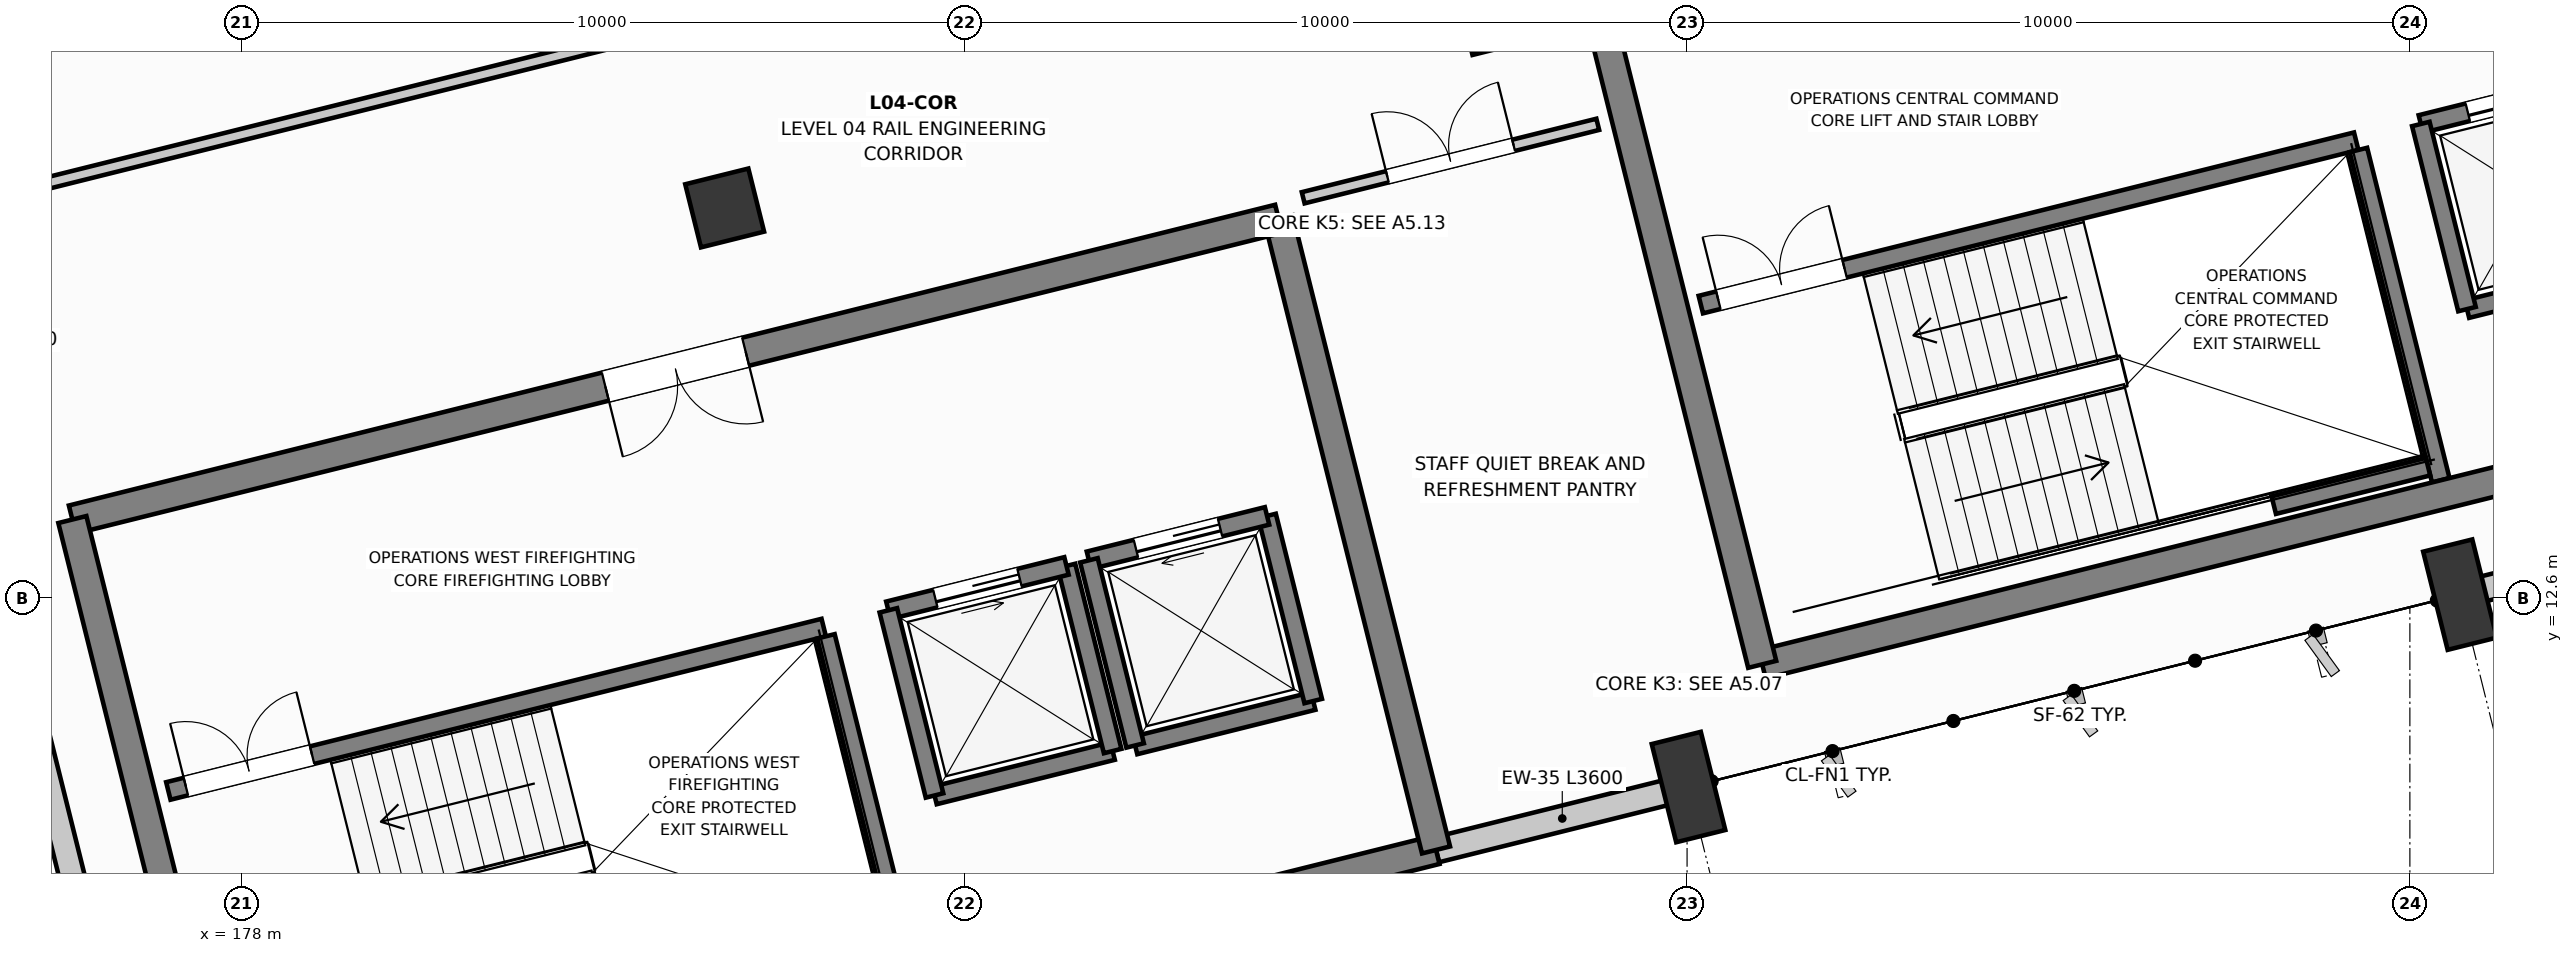
"""IFC4 building model, lengths in metres.
Left out: names, types, materials, properties, quantities, classifications, styles, units other than length and angle.
Written with IfcOpenShell. Run it as: python <this file> out.ifc"""

import sys

from ifc_helpers import new_model, si_unit, direction, frame, frame_2d, origin, origin_2d, place, context, subcontext, project, spatial, rectangle, extrude, element, fill, save


model = new_model("IFC4")
c1 = context("Model", 3, precision=1e-05, world=origin(), true_north=direction((0.0, 1.0)))
c2 = subcontext(c1, "Body", "Model", "MODEL_VIEW")
j1 = project(units=[si_unit("LENGTHUNIT", "METRE"), si_unit("PLANEANGLEUNIT", "RADIAN")], contexts=[c1])
p1 = place(None, origin())
s1 = spatial("IfcSite", under=j1, at=p1, CompositionType="ELEMENT")
p2 = place(p1, origin())
s2 = spatial("IfcBuilding", under=s1, at=p2, CompositionType="ELEMENT")
p3 = place(p2, frame((0.0, 0.0, 20.4)))
s3 = spatial("IfcBuildingStorey", under=s2, at=p3, CompositionType="ELEMENT", Elevation=20.4)
p4 = place(p3, frame((184.685, 17.995, 0.0), z_axis=(0.0, 0.0, 1.0), x_axis=(0.970295726276, 0.2419218956, 0.0)))
e1 = element("IfcColumn", 1, at=p4, inside=s3, PredefinedType="COLUMN", context=c2, shape_type="SweptSolid", body=[
    extrude(rectangle(XDim=0.9, YDim=0.9, at=origin_2d()), origin(), (0.0, 0.0, 1.0), 4.2),
])
p5 = place(p3, frame((198.02, 9.983, 0.0), z_axis=(0.0, 0.0, 1.0), x_axis=(0.970295726276, 0.2419218956, 0.0)))
e2 = element("IfcColumn", 2, at=p5, inside=s3, PredefinedType="COLUMN", context=c2, shape_type="SweptSolid", body=[
    extrude(rectangle(XDim=0.7, YDim=1.4, at=origin_2d()), origin(), (0.0, 0.0, 1.0), 4.2),
])
p6 = place(p3, frame((195.359, 20.657, 0.0), z_axis=(0.0, 0.0, 1.0), x_axis=(0.970295726276, 0.2419218956, 0.0)))
e3 = element("IfcColumn", 3, at=p6, inside=s3, PredefinedType="COLUMN", context=c2, shape_type="SweptSolid", body=[
    extrude(rectangle(XDim=0.9, YDim=0.9, at=origin_2d()), origin(), (0.0, 0.0, 1.0), 4.2),
])
p7 = place(p3, frame((208.693, 12.645, 0.0), z_axis=(0.0, 0.0, 1.0), x_axis=(0.970295726276, 0.2419218956, 0.0)))
e4 = element("IfcColumn", 4, at=p7, inside=s3, PredefinedType="COLUMN", context=c2, shape_type="SweptSolid", body=[
    extrude(rectangle(XDim=0.7, YDim=1.4, at=origin_2d()), origin(), (0.0, 0.0, 1.0), 4.2),
])
p8 = place(p3, frame((208.999, 12.721, 0.0), z_axis=(0.0, 0.0, 1.0), x_axis=(0.970297165187, 0.241916124371, 0.0)))
e5 = element("IfcWall", 5, at=p8, inside=s3, PredefinedType="STANDARD", context=c2, shape_type="SweptSolid", body=[
    extrude(rectangle(XDim=10.37, YDim=0.35, at=frame_2d((5.185, 0.0))), origin(), (0.0, 0.0, 1.0), 3.255),
])
p9 = place(p8, frame((1.692, 0.0, 0.85)))
e6 = element("IfcOpeningElement", 6, at=p9, cuts=e5, PredefinedType="OPENING", context=c2, shape_type="SweptSolid", body=[
    extrude(rectangle(XDim=1.8, YDim=1.65, at=frame_2d((0.9, 0.825))), frame((0.0, 0.185, 0.0), z_axis=(0.0, -1.0, 0.0), x_axis=(1.0, 0.0, 0.0)), (0.0, 0.0, 1.0), 0.37),
])
p10 = place(p8, frame((6.877, 0.0, 0.85)))
e7 = element("IfcOpeningElement", 7, at=p10, cuts=e5, PredefinedType="OPENING", context=c2, shape_type="SweptSolid", body=[
    extrude(rectangle(XDim=1.8, YDim=1.65, at=frame_2d((0.9, 0.825))), frame((0.0, 0.185, 0.0), z_axis=(0.0, -1.0, 0.0), x_axis=(1.0, 0.0, 0.0)), (0.0, 0.0, 1.0), 0.37),
])
p11 = place(p3, frame((174.113, 14.931, 0.0), z_axis=(0.0, 0.0, 1.0), x_axis=(0.241921235018, -0.970295890977, 0.0)))
e8 = element("IfcWall", 8, at=p11, inside=s3, PredefinedType="STANDARD", context=c2, shape_type="SweptSolid", body=[
    extrude(rectangle(XDim=9.92, YDim=0.35, at=frame_2d((4.96, 0.0))), origin(), (0.0, 0.0, 1.0), 2.795),
])
p12 = place(p11, frame((1.58, 0.0, 0.85)))
e9 = element("IfcOpeningElement", 9, at=p12, cuts=e8, PredefinedType="OPENING", context=c2, shape_type="SweptSolid", body=[
    extrude(rectangle(XDim=1.8, YDim=1.65, at=frame_2d((0.9, 0.825))), frame((0.0, 0.185, 0.0), z_axis=(0.0, -1.0, 0.0), x_axis=(1.0, 0.0, 0.0)), (0.0, 0.0, 1.0), 0.37),
])
p13 = place(p11, frame((6.54, 0.0, 0.85)))
e10 = element("IfcOpeningElement", 10, at=p13, cuts=e8, PredefinedType="OPENING", context=c2, shape_type="SweptSolid", body=[
    extrude(rectangle(XDim=1.8, YDim=1.65, at=frame_2d((0.9, 0.825))), frame((0.0, 0.185, 0.0), z_axis=(0.0, -1.0, 0.0), x_axis=(1.0, 0.0, 0.0)), (0.0, 0.0, 1.0), 0.37),
])
p14 = place(p3, frame((194.527, 9.113, 0.0), z_axis=(0.0, 0.0, 1.0), x_axis=(0.970297528922, 0.241914665466, 0.0)))
e11 = element("IfcWall", 11, at=p14, inside=s3, PredefinedType="STANDARD", context=c2, shape_type="SweptSolid", body=[
    extrude(rectangle(XDim=3.6, YDim=0.35, at=frame_2d((1.8, 0.0))), origin(), (0.0, 0.0, 1.0), 3.855),
])
p15 = place(p3, frame((187.588, 9.866, 0.0), z_axis=(0.0, 0.0, 1.0), x_axis=(0.97029284861, 0.241933436994, 0.0)))
e12 = element("IfcWall", 12, at=p15, inside=s3, PredefinedType="SOLIDWALL", context=c2, shape_type="SweptSolid", body=[
    extrude(rectangle(XDim=2.54, YDim=0.25, at=frame_2d((1.27, 0.0))), origin(), (0.0, 0.0, 1.0), 3.88),
])
p16 = place(p3, frame((190.053, 10.481, 0.0), z_axis=(0.0, 0.0, 1.0), x_axis=(-0.241938414856, 0.970291607413, 0.0)))
e13 = element("IfcWall", 13, at=p16, inside=s3, PredefinedType="SOLIDWALL", context=c2, shape_type="SweptSolid", body=[
    extrude(rectangle(XDim=2.64, YDim=0.25, at=frame_2d((1.32, 0.0))), origin(), (0.0, 0.0, 1.0), 3.88),
])
p17 = place(p3, frame((189.414, 13.042, 0.0), z_axis=(0.0, 0.0, 1.0), x_axis=(-0.97029284861, -0.241933436994, 0.0)))
e14 = element("IfcWall", 14, at=p17, inside=s3, PredefinedType="SOLIDWALL", context=c2, shape_type="SweptSolid", body=[
    extrude(rectangle(XDim=2.54, YDim=0.25, at=frame_2d((1.27, 0.0))), origin(), (0.0, 0.0, 1.0), 3.88),
])
p18 = place(p17, frame((0.67, 0.0, 0.0)))
e15 = element("IfcOpeningElement", 15, at=p18, cuts=e14, PredefinedType="OPENING", context=c2, shape_type="SweptSolid", body=[
    extrude(rectangle(XDim=1.2, YDim=2.2, at=frame_2d((0.6, 1.1))), frame((0.0, 0.135, 0.0), z_axis=(0.0, -1.0, 0.0), x_axis=(1.0, 0.0, 0.0)), (0.0, 0.0, 1.0), 0.27),
])
p19 = place(p3, frame((186.95, 12.428, 0.0), z_axis=(0.0, 0.0, 1.0), x_axis=(0.241938414856, -0.970291607413, 0.0)))
e16 = element("IfcWall", 16, at=p19, inside=s3, PredefinedType="SOLIDWALL", context=c2, shape_type="SweptSolid", body=[
    extrude(rectangle(XDim=2.64, YDim=0.25, at=frame_2d((1.32, 0.0))), origin(), (0.0, 0.0, 1.0), 3.88),
])
p20 = place(p3, frame((190.363, 10.558, 0.0), z_axis=(0.0, 0.0, 1.0), x_axis=(0.97029284861, 0.241933436994, 0.0)))
e17 = element("IfcWall", 17, at=p20, inside=s3, PredefinedType="SOLIDWALL", context=c2, shape_type="SweptSolid", body=[
    extrude(rectangle(XDim=2.54, YDim=0.25, at=frame_2d((1.27, 0.0))), origin(), (0.0, 0.0, 1.0), 3.88),
])
p21 = place(p3, frame((192.828, 11.173, 0.0), z_axis=(0.0, 0.0, 1.0), x_axis=(-0.241938414856, 0.970291607413, 0.0)))
e18 = element("IfcWall", 18, at=p21, inside=s3, PredefinedType="SOLIDWALL", context=c2, shape_type="SweptSolid", body=[
    extrude(rectangle(XDim=2.64, YDim=0.25, at=frame_2d((1.32, 0.0))), origin(), (0.0, 0.0, 1.0), 3.88),
])
p22 = place(p3, frame((192.189, 13.734, 0.0), z_axis=(0.0, 0.0, 1.0), x_axis=(-0.97029284861, -0.241933436994, 0.0)))
e19 = element("IfcWall", 19, at=p22, inside=s3, PredefinedType="SOLIDWALL", context=c2, shape_type="SweptSolid", body=[
    extrude(rectangle(XDim=2.54, YDim=0.25, at=frame_2d((1.27, 0.0))), origin(), (0.0, 0.0, 1.0), 3.88),
])
p23 = place(p22, frame((0.67, 0.0, 0.0)))
e20 = element("IfcOpeningElement", 20, at=p23, cuts=e19, PredefinedType="OPENING", context=c2, shape_type="SweptSolid", body=[
    extrude(rectangle(XDim=1.2, YDim=2.2, at=frame_2d((0.6, 1.1))), frame((0.0, 0.135, 0.0), z_axis=(0.0, -1.0, 0.0), x_axis=(1.0, 0.0, 0.0)), (0.0, 0.0, 1.0), 0.27),
])
p24 = place(p3, frame((189.725, 13.12, 0.0), z_axis=(0.0, 0.0, 1.0), x_axis=(0.241938414856, -0.970291607413, 0.0)))
e21 = element("IfcWall", 21, at=p24, inside=s3, PredefinedType="SOLIDWALL", context=c2, shape_type="SweptSolid", body=[
    extrude(rectangle(XDim=2.64, YDim=0.25, at=frame_2d((1.32, 0.0))), origin(), (0.0, 0.0, 1.0), 3.88),
])
p25 = place(p3, frame((208.79, 16.595, 0.0), z_axis=(0.0, 0.0, 1.0), x_axis=(0.97029284861, 0.241933436994, 0.0)))
e22 = element("IfcWall", 22, at=p25, inside=s3, PredefinedType="SOLIDWALL", context=c2, shape_type="SweptSolid", body=[
    extrude(rectangle(XDim=2.54, YDim=0.25, at=frame_2d((1.27, 0.0))), origin(), (0.0, 0.0, 1.0), 3.88),
])
p26 = place(p3, frame((210.616, 19.771, 0.0), z_axis=(0.0, 0.0, 1.0), x_axis=(-0.97029284861, -0.241933436994, 0.0)))
e23 = element("IfcWall", 23, at=p26, inside=s3, PredefinedType="SOLIDWALL", context=c2, shape_type="SweptSolid", body=[
    extrude(rectangle(XDim=2.54, YDim=0.25, at=frame_2d((1.27, 0.0))), origin(), (0.0, 0.0, 1.0), 3.88),
])
p27 = place(p26, frame((0.67, 0.0, 0.0)))
e24 = element("IfcOpeningElement", 24, at=p27, cuts=e23, PredefinedType="OPENING", context=c2, shape_type="SweptSolid", body=[
    extrude(rectangle(XDim=1.2, YDim=2.2, at=frame_2d((0.6, 1.1))), frame((0.0, 0.135, 0.0), z_axis=(0.0, -1.0, 0.0), x_axis=(1.0, 0.0, 0.0)), (0.0, 0.0, 1.0), 0.27),
])
p28 = place(p3, frame((208.151, 19.157, 0.0), z_axis=(0.0, 0.0, 1.0), x_axis=(0.241938414856, -0.970291607413, 0.0)))
e25 = element("IfcWall", 25, at=p28, inside=s3, PredefinedType="SOLIDWALL", context=c2, shape_type="SweptSolid", body=[
    extrude(rectangle(XDim=2.64, YDim=0.25, at=frame_2d((1.32, 0.0))), origin(), (0.0, 0.0, 1.0), 3.88),
])
p29 = place(p3, frame((176.988, 9.929, 0.0), z_axis=(0.0, 0.0, 1.0), x_axis=(0.970297151331, 0.241916179943, 0.0)))
e26 = element("IfcWall", 26, at=p29, inside=s3, PredefinedType="SOLIDWALL", context=c2, shape_type="SweptSolid", body=[
    extrude(rectangle(XDim=9.345, YDim=0.25, at=frame_2d((4.673, 0.0))), origin(), (0.0, 0.0, 1.0), 3.85),
])
p30 = place(p29, frame((0.25, 0.0, 0.0)))
e27 = element("IfcOpeningElement", 27, at=p30, cuts=e26, PredefinedType="OPENING", context=c2, shape_type="SweptSolid", body=[
    extrude(rectangle(XDim=1.8, YDim=2.25, at=frame_2d((0.9, 1.125))), frame((0.0, 0.135, 0.0), z_axis=(0.0, -1.0, 0.0), x_axis=(1.0, 0.0, 0.0)), (0.0, 0.0, 1.0), 0.27),
])
p31 = place(p3, frame((187.225, 7.498, 0.0), z_axis=(0.0, 0.0, 1.0), x_axis=(-0.241911120435, 0.970298412763, 0.0)))
e28 = element("IfcWall", 28, at=p31, inside=s3, PredefinedType="SOLIDWALL", context=c2, shape_type="SweptSolid", body=[
    extrude(rectangle(XDim=4.71, YDim=0.25, at=frame_2d((2.355, 0.0))), origin(), (0.0, 0.0, 1.0), 3.85),
])
p32 = place(p3, frame((177.838, 4.951, 0.0), z_axis=(0.0, 0.0, 1.0), x_axis=(0.970295179998, 0.241924086589, 0.0)))
e29 = element("IfcWall", 29, at=p32, inside=s3, PredefinedType="SHEAR", context=c2, shape_type="SweptSolid", body=[
    extrude(rectangle(XDim=17.2, YDim=0.4, at=frame_2d((8.6, 0.0))), origin(), (0.0, 0.0, 1.0), 3.88),
])
p33 = place(p3, frame((194.527, 9.113, 0.0), z_axis=(0.0, 0.0, 1.0), x_axis=(-0.241923808098, 0.970295249435, 0.0)))
e30 = element("IfcWall", 30, at=p33, inside=s3, PredefinedType="SHEAR", context=c2, shape_type="SweptSolid", body=[
    extrude(rectangle(XDim=9.0, YDim=0.4, at=frame_2d((4.5, 0.0))), origin(), (0.0, 0.0, 1.0), 3.88),
])
p34 = place(p3, frame((192.349, 17.845, 0.0), z_axis=(0.0, 0.0, 1.0), x_axis=(-0.970296544738, -0.241918612906, 0.0)))
e31 = element("IfcWall", 31, at=p34, inside=s3, PredefinedType="SHEAR", context=c2, shape_type="SweptSolid", body=[
    extrude(rectangle(XDim=17.2, YDim=0.4, at=frame_2d((8.6, 0.0))), origin(), (0.0, 0.0, 1.0), 3.88),
])
p35 = place(p34, frame((7.6, 0.0, 0.0)))
e32 = element("IfcOpeningElement", 32, at=p35, cuts=e31, PredefinedType="OPENING", context=c2, shape_type="SweptSolid", body=[
    extrude(rectangle(XDim=2.0, YDim=2.3, at=frame_2d((1.0, 1.15))), frame((0.0, 0.21, 0.0), z_axis=(0.0, -1.0, 0.0), x_axis=(1.0, 0.0, 0.0)), (0.0, 0.0, 1.0), 0.42),
])
p36 = place(p3, frame((175.66, 13.684, 0.0), z_axis=(0.0, 0.0, 1.0), x_axis=(0.241921199913, -0.97029589973, 0.0)))
e33 = element("IfcWall", 33, at=p36, inside=s3, PredefinedType="SHEAR", context=c2, shape_type="SweptSolid", body=[
    extrude(rectangle(XDim=9.0, YDim=0.4, at=frame_2d((4.5, 0.0))), origin(), (0.0, 0.0, 1.0), 3.88),
])
p37 = place(p3, frame((198.19, 16.658, 0.0), z_axis=(0.0, 0.0, 1.0), x_axis=(0.970297151331, 0.241916179943, 0.0)))
e34 = element("IfcWall", 34, at=p37, inside=s3, PredefinedType="SOLIDWALL", context=c2, shape_type="SweptSolid", body=[
    extrude(rectangle(XDim=9.345, YDim=0.25, at=frame_2d((4.673, 0.0))), origin(), (0.0, 0.0, 1.0), 3.85),
])
p38 = place(p37, frame((0.25, 0.0, 0.0)))
e35 = element("IfcOpeningElement", 35, at=p38, cuts=e34, PredefinedType="OPENING", context=c2, shape_type="SweptSolid", body=[
    extrude(rectangle(XDim=1.8, YDim=2.25, at=frame_2d((0.9, 1.125))), frame((0.0, 0.135, 0.0), z_axis=(0.0, -1.0, 0.0), x_axis=(1.0, 0.0, 0.0)), (0.0, 0.0, 1.0), 0.27),
])
p39 = place(p3, frame((208.427, 14.227, 0.0), z_axis=(0.0, 0.0, 1.0), x_axis=(-0.241911120435, 0.970298412763, 0.0)))
e36 = element("IfcWall", 36, at=p39, inside=s3, PredefinedType="SOLIDWALL", context=c2, shape_type="SweptSolid", body=[
    extrude(rectangle(XDim=4.71, YDim=0.25, at=frame_2d((2.355, 0.0))), origin(), (0.0, 0.0, 1.0), 3.85),
])
p40 = place(p3, frame((206.117, 13.883, 0.0), z_axis=(0.0, 0.0, 1.0), x_axis=(0.97029738597, 0.241915238833, 0.0)))
e37 = element("IfcWall", 37, at=p40, inside=s3, PredefinedType="SOLIDWALL", context=c2, shape_type="SweptSolid", body=[
    extrude(rectangle(XDim=2.2, YDim=0.25, at=frame_2d((1.1, 0.0))), origin(), (0.0, 0.0, 1.0), 3.85),
])
p41 = place(p3, frame((199.04, 11.681, 0.0), z_axis=(0.0, 0.0, 1.0), x_axis=(0.970295578967, 0.241922486422, 0.0)))
e38 = element("IfcWall", 38, at=p41, inside=s3, PredefinedType="SHEAR", context=c2, shape_type="SweptSolid", body=[
    extrude(rectangle(XDim=14.2, YDim=0.4, at=frame_2d((7.1, 0.0))), origin(), (0.0, 0.0, 1.0), 3.88),
])
p42 = place(p3, frame((196.862, 20.413, 0.0), z_axis=(0.0, 0.0, 1.0), x_axis=(0.241921199913, -0.97029589973, 0.0)))
e39 = element("IfcWall", 39, at=p42, inside=s3, PredefinedType="SHEAR", context=c2, shape_type="SweptSolid", body=[
    extrude(rectangle(XDim=9.0, YDim=0.4, at=frame_2d((4.5, 0.0))), origin(), (0.0, 0.0, 1.0), 3.88),
])
p43 = place(p3, frame((205.267, 25.807, 0.0), z_axis=(0.0, 0.0, 1.0), x_axis=(-0.970295074314, -0.241924510463, 0.0)))
e40 = element("IfcWall", 40, at=p43, inside=s3, PredefinedType="PARTITIONING", context=c2, shape_type="SweptSolid", body=[
    extrude(rectangle(XDim=32.46, YDim=0.16, at=frame_2d((16.23, 0.0))), origin(), (0.0, 0.0, 1.0), 2.645),
])
p44 = place(p43, frame((15.68, 0.0, 0.0)))
e41 = element("IfcOpeningElement", 41, at=p44, cuts=e40, PredefinedType="OPENING", context=c2, shape_type="SweptSolid", body=[
    extrude(rectangle(XDim=1.1, YDim=2.2, at=frame_2d((0.55, 1.1))), frame((0.0, 0.09, 0.0), z_axis=(0.0, -1.0, 0.0), x_axis=(1.0, 0.0, 0.0)), (0.0, 0.0, 1.0), 0.18),
])
p45 = place(p3, frame((192.689, 18.136, 0.0), z_axis=(0.0, 0.0, 1.0), x_axis=(0.970294966744, 0.241924941896, 0.0)))
e42 = element("IfcWall", 42, at=p45, inside=s3, PredefinedType="PARTITIONING", context=c2, shape_type="SweptSolid", body=[
    extrude(rectangle(XDim=4.2, YDim=0.16, at=frame_2d((2.1, 0.0))), origin(), (0.0, 0.0, 1.0), 3.205),
])
p46 = place(p45, frame((1.2, 0.0, 0.0)))
e43 = element("IfcOpeningElement", 43, at=p46, cuts=e42, PredefinedType="OPENING", context=c2, shape_type="SweptSolid", body=[
    extrude(rectangle(XDim=1.8, YDim=2.25, at=frame_2d((0.9, 1.125))), frame((0.0, 0.09, 0.0), z_axis=(0.0, -1.0, 0.0), x_axis=(1.0, 0.0, 0.0)), (0.0, 0.0, 1.0), 0.18),
])
p47 = place(p18, origin())
e44 = element("IfcDoor", 44, at=p47, inside=s3, OperationType="SLIDING_TO_LEFT", PredefinedType="DOOR", context=c2, shape_type="SweptSolid", body=[
    extrude(rectangle(XDim=1.2, YDim=2.2, at=frame_2d((0.6, 1.1))), frame((0.0, 0.025, 0.0), z_axis=(0.0, -1.0, 0.0), x_axis=(1.0, 0.0, 0.0)), (0.0, 0.0, 1.0), 0.05),
])
fill(e15, e44)
p48 = place(p23, origin())
e45 = element("IfcDoor", 45, at=p48, inside=s3, OperationType="SLIDING_TO_RIGHT", PredefinedType="DOOR", context=c2, shape_type="SweptSolid", body=[
    extrude(rectangle(XDim=1.2, YDim=2.2, at=frame_2d((0.6, 1.1))), frame((0.0, 0.025, 0.0), z_axis=(0.0, -1.0, 0.0), x_axis=(1.0, 0.0, 0.0)), (0.0, 0.0, 1.0), 0.05),
])
fill(e20, e45)
p49 = place(p27, origin())
e46 = element("IfcDoor", 46, at=p49, inside=s3, OperationType="SLIDING_TO_LEFT", PredefinedType="DOOR", context=c2, shape_type="SweptSolid", body=[
    extrude(rectangle(XDim=1.2, YDim=2.2, at=frame_2d((0.6, 1.1))), frame((0.0, 0.025, 0.0), z_axis=(0.0, -1.0, 0.0), x_axis=(1.0, 0.0, 0.0)), (0.0, 0.0, 1.0), 0.05),
])
fill(e24, e46)
p50 = place(p30, origin())
e47 = element("IfcDoor", 47, at=p50, inside=s3, OperationType="DOUBLE_DOOR_SINGLE_SWING", PredefinedType="DOOR", context=c2, shape_type="SweptSolid", body=[
    extrude(rectangle(XDim=1.8, YDim=2.25, at=frame_2d((0.9, 1.125))), frame((0.0, 0.025, 0.0), z_axis=(0.0, -1.0, 0.0), x_axis=(1.0, 0.0, 0.0)), (0.0, 0.0, 1.0), 0.05),
])
fill(e27, e47)
p51 = place(p35, origin())
e48 = element("IfcDoor", 48, at=p51, inside=s3, OperationType="DOUBLE_DOOR_SINGLE_SWING", PredefinedType="DOOR", context=c2, shape_type="SweptSolid", body=[
    extrude(rectangle(XDim=2.0, YDim=2.3, at=frame_2d((1.0, 1.15))), frame((0.0, 0.025, 0.0), z_axis=(0.0, -1.0, 0.0), x_axis=(1.0, 0.0, 0.0)), (0.0, 0.0, 1.0), 0.05),
])
fill(e32, e48)
p52 = place(p38, origin())
e49 = element("IfcDoor", 49, at=p52, inside=s3, OperationType="DOUBLE_DOOR_SINGLE_SWING", PredefinedType="DOOR", context=c2, shape_type="SweptSolid", body=[
    extrude(rectangle(XDim=1.8, YDim=2.25, at=frame_2d((0.9, 1.125))), frame((0.0, 0.025, 0.0), z_axis=(0.0, -1.0, 0.0), x_axis=(1.0, 0.0, 0.0)), (0.0, 0.0, 1.0), 0.05),
])
fill(e35, e49)
p53 = place(p46, origin())
e50 = element("IfcDoor", 50, at=p53, inside=s3, OperationType="DOUBLE_DOOR_SINGLE_SWING", PredefinedType="DOOR", context=c2, shape_type="SweptSolid", body=[
    extrude(rectangle(XDim=1.8, YDim=2.25, at=frame_2d((0.9, 1.125))), frame((0.0, 0.025, 0.0), z_axis=(0.0, -1.0, 0.0), x_axis=(1.0, 0.0, 0.0)), (0.0, 0.0, 1.0), 0.05),
])
fill(e43, e50)
save(model, sys.argv[1])
